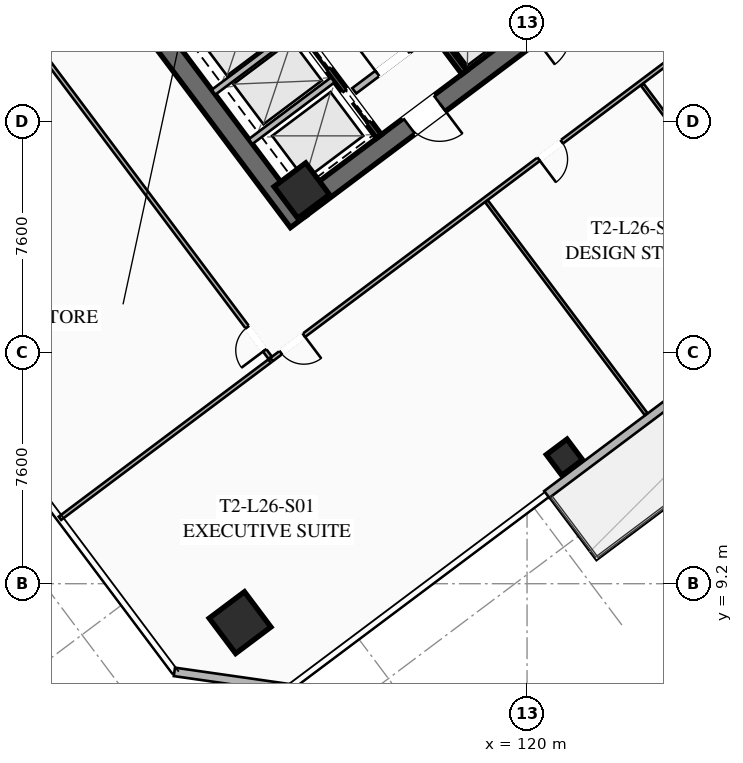
"""IFC4 building model, lengths in metres.
Left out: names, types, materials, properties, quantities, classifications, styles, units other than length and angle.
Written with IfcOpenShell. Run it as: python <this file> out.ifc"""

import sys

from ifc_helpers import new_model, si_unit, direction, frame, frame_2d, origin, origin_2d, place, context, subcontext, project, spatial, rectangle, hollow_rectangle, extrude, element, fill, save


model = new_model("IFC4")
c1 = context("Model", 3, precision=1e-05, world=origin(), true_north=direction((0.0, 1.0)))
c2 = subcontext(c1, "Body", "Model", "MODEL_VIEW")
j1 = project(units=[si_unit("LENGTHUNIT", "METRE"), si_unit("PLANEANGLEUNIT", "RADIAN")], contexts=[c1])
p1 = place(None, origin())
s1 = spatial("IfcSite", under=j1, at=p1, CompositionType="ELEMENT")
p2 = place(p1, origin())
s2 = spatial("IfcBuilding", under=s1, at=p2, CompositionType="ELEMENT")
p3 = place(p2, frame((0.0, 0.0, 99.15)))
s3 = spatial("IfcBuildingStorey", under=s2, at=p3, CompositionType="ELEMENT", Elevation=99.15)
p4 = place(p3, frame((112.476, 21.107, 0.0), z_axis=(0.0, 0.0, 1.0), x_axis=(-0.600005007985, 0.799996243986, 0.0)))
e1 = element("IfcWall", 1, at=p4, inside=s3, PredefinedType="SHEAR", context=c2, shape_type="SweptSolid", body=[
    extrude(rectangle(XDim=15.6, YDim=0.65, at=frame_2d((7.8, 0.0))), origin(), (0.0, 0.0, 1.0), 3.55),
])
p5 = place(p3, frame((124.429, 30.478, 0.0), z_axis=(0.0, 0.0, 1.0), x_axis=(-0.799998028465, -0.600002628705, 0.0)))
e2 = element("IfcWall", 2, at=p5, inside=s3, PredefinedType="SHEAR", context=c2, shape_type="SweptSolid", body=[
    extrude(rectangle(XDim=14.86, YDim=0.65, at=frame_2d((7.43, 0.0))), origin(), (0.0, 0.0, 1.0), 3.55),
])
p6 = place(p5, frame((9.13, 0.0, 0.0)))
e3 = element("IfcOpeningElement", 3, at=p6, cuts=e2, PredefinedType="OPENING", context=c2, shape_type="SweptSolid", body=[
    extrude(rectangle(XDim=1.25, YDim=2.25, at=frame_2d((0.625, 1.125))), frame((0.0, 0.335, 0.0), z_axis=(0.0, -1.0, 0.0), x_axis=(1.0, 0.0, 0.0)), (0.0, 0.0, 1.0), 0.67),
])
p7 = place(p5, frame((4.08, 0.0, 0.0)))
e4 = element("IfcOpeningElement", 4, at=p7, cuts=e2, PredefinedType="OPENING", context=c2, shape_type="SweptSolid", body=[
    extrude(rectangle(XDim=1.25, YDim=2.25, at=frame_2d((0.625, 1.125))), frame((0.0, 0.335, 0.0), z_axis=(0.0, -1.0, 0.0), x_axis=(1.0, 0.0, 0.0)), (0.0, 0.0, 1.0), 0.67),
])
p8 = place(p3, frame((112.59, 22.13, 0.0), z_axis=(0.0, 0.0, 1.0), x_axis=(0.799999996291, 0.600000004945, 0.0)))
e5 = element("IfcColumn", 5, at=p8, inside=s3, PredefinedType="COLUMN", context=c2, shape_type="SweptSolid", body=[
    extrude(hollow_rectangle(XDim=1.3, YDim=1.3, WallThickness=0.05, at=origin_2d()), origin(), (0.0, 0.0, 1.0), 3.35),
])
p9 = place(p3, frame((110.56, 7.92, 0.0), z_axis=(0.0, 0.0, 1.0), x_axis=(0.799999996291, 0.600000004945, 0.0)))
e6 = element("IfcColumn", 6, at=p9, inside=s3, PredefinedType="COLUMN", context=c2, shape_type="SweptSolid", body=[
    extrude(hollow_rectangle(XDim=1.45, YDim=1.45, WallThickness=0.055, at=origin_2d()), origin(), (0.0, 0.0, 1.0), 3.35),
])
p10 = place(p3, frame((121.23, 13.36, 0.0), z_axis=(0.0, 0.0, 1.0), x_axis=(0.799999996291, 0.600000004945, 0.0)))
e7 = element("IfcColumn", 7, at=p10, inside=s3, PredefinedType="COLUMN", context=c2, shape_type="SweptSolid", body=[
    extrude(hollow_rectangle(XDim=0.85, YDim=0.85, WallThickness=0.035, at=origin_2d()), origin(), (0.0, 0.0, 1.0), 3.35),
])
p11 = place(p3, frame((131.208, 20.056, 0.0), z_axis=(0.0, 0.0, 1.0), x_axis=(-0.800004438899, -0.599994081423, 0.0)))
e8 = element("IfcWall", 8, at=p11, inside=s3, PredefinedType="SOLIDWALL", context=c2, shape_type="SweptSolid", body=[
    extrude(rectangle(XDim=13.2, YDim=0.28, at=frame_2d((6.6, 0.0))), origin(), (0.0, 0.0, 1.0), 3.35),
])
p12 = place(p11, frame((5.95, 0.0, 0.0)))
e9 = element("IfcOpeningElement", 9, at=p12, cuts=e8, PredefinedType="OPENING", context=c2, shape_type="SweptSolid", body=[
    extrude(rectangle(XDim=1.3, YDim=2.15, at=frame_2d((0.65, 1.075))), frame((0.0, 0.15, 0.0), z_axis=(0.0, -1.0, 0.0), x_axis=(1.0, 0.0, 0.0)), (0.0, 0.0, 1.0), 0.3),
])
p13 = place(p3, frame((112.18, 5.76, 0.0), z_axis=(0.0, 0.0, 1.0), x_axis=(-0.989948214866, 0.141430307517, 0.0)))
e10 = element("IfcWall", 10, at=p13, inside=s3, PredefinedType="SOLIDWALL", context=c2, shape_type="SweptSolid", body=[
    extrude(rectangle(XDim=3.818, YDim=0.28, at=frame_2d((1.909, 0.0))), origin(), (0.0, 0.0, 1.0), 3.35),
])
p14 = place(p3, frame((117.938, 26.016, 0.0), z_axis=(0.0, 0.0, 1.0), x_axis=(-0.600005463273, 0.799995902516, 0.0)))
e11 = element("IfcWall", 11, at=p14, inside=s3, PredefinedType="SHEAR", context=c2, shape_type="SweptSolid", body=[
    extrude(rectangle(XDim=14.3, YDim=0.2, at=frame_2d((7.15, 0.0))), origin(), (0.0, 0.0, 1.0), 3.35),
])
p15 = place(p3, frame((114.316, 25.412, 0.0), z_axis=(0.0, 0.0, 1.0), x_axis=(0.800018601094, 0.59997519774, 0.0)))
e12 = element("IfcWall", 12, at=p15, inside=s3, PredefinedType="SOLIDWALL", context=c2, shape_type="SweptSolid", body=[
    extrude(rectangle(XDim=3.15, YDim=0.22, at=frame_2d((1.575, 0.0))), origin(), (0.0, 0.0, 1.0), 2.703),
])
p16 = place(p15, frame((0.95, 0.0, 0.0)))
e13 = element("IfcOpeningElement", 13, at=p16, cuts=e12, PredefinedType="OPENING", context=c2, shape_type="SweptSolid", body=[
    extrude(rectangle(XDim=1.25, YDim=2.25, at=frame_2d((0.625, 1.125))), frame((0.0, 0.12, 0.0), z_axis=(0.0, -1.0, 0.0), x_axis=(1.0, 0.0, 0.0)), (0.0, 0.0, 1.0), 0.24),
])
p17 = place(p3, frame((115.13, 23.91, 0.0), z_axis=(0.0, 0.0, 1.0), x_axis=(-0.599975393228, 0.800018454488, 0.0)))
e14 = element("IfcWall", 14, at=p17, inside=s3, PredefinedType="SHEAR", context=c2, shape_type="SweptSolid", body=[
    extrude(rectangle(XDim=6.35, YDim=0.2, at=frame_2d((3.175, 0.0))), origin(), (0.0, 0.0, 1.0), 3.35),
])
p18 = place(p17, frame((4.775, 0.0, 0.0)))
e15 = element("IfcOpeningElement", 15, at=p18, cuts=e14, PredefinedType="OPENING", context=c2, shape_type="SweptSolid", body=[
    extrude(rectangle(XDim=1.3, YDim=2.25, at=frame_2d((0.65, 1.125))), frame((0.0, 0.11, 0.0), z_axis=(0.0, -1.0, 0.0), x_axis=(1.0, 0.0, 0.0)), (0.0, 0.0, 1.0), 0.22),
])
p19 = place(p17, frame((2.775, 0.0, 0.0)))
e16 = element("IfcOpeningElement", 16, at=p19, cuts=e14, PredefinedType="OPENING", context=c2, shape_type="SweptSolid", body=[
    extrude(rectangle(XDim=1.3, YDim=2.25, at=frame_2d((0.65, 1.125))), frame((0.0, 0.11, 0.0), z_axis=(0.0, -1.0, 0.0), x_axis=(1.0, 0.0, 0.0)), (0.0, 0.0, 1.0), 0.22),
])
p20 = place(p17, frame((0.575, 0.0, 0.0)))
e17 = element("IfcOpeningElement", 17, at=p20, cuts=e14, PredefinedType="OPENING", context=c2, shape_type="SweptSolid", body=[
    extrude(rectangle(XDim=1.3, YDim=2.25, at=frame_2d((0.65, 1.125))), frame((0.0, 0.11, 0.0), z_axis=(0.0, -1.0, 0.0), x_axis=(1.0, 0.0, 0.0)), (0.0, 0.0, 1.0), 0.22),
])
for number, where, z_axis, x_axis in (
    (18, (110.906, 23.742, 0.0), (0.0, 0.0, 1.0), (0.8, 0.6, 0.0)),
    (19, (109.688, 25.366, 0.0), (0.0, 0.0, 1.0), (0.8, 0.6, 0.0)),
):
    element("IfcWall", number, at=place(p3, frame(where, z_axis=z_axis, x_axis=x_axis)), inside=s3, PredefinedType="SOLIDWALL", context=c2, shape_type="SweptSolid", body=[
        extrude(rectangle(XDim=3.38, YDim=0.2, at=frame_2d((1.69, 0.0))), origin(), (0.0, 0.0, 1.0), 3.35),
    ])
p21 = place(p3, frame((134.18, 33.51, 0.0), z_axis=(0.0, 0.0, 1.0), x_axis=(-0.8, -0.6, 0.0)))
e20 = element("IfcWall", 20, at=p21, inside=s3, PredefinedType="PARTITIONING", context=c2, shape_type="SweptSolid", body=[
    extrude(rectangle(XDim=28.23, YDim=0.135, at=frame_2d((14.115, 0.0))), origin(), (0.0, 0.0, 1.0), 2.703),
])
p22 = place(p21, frame((26.9, 0.0, 0.0)))
e21 = element("IfcOpeningElement", 21, at=p22, cuts=e20, PredefinedType="OPENING", context=c2, shape_type="SweptSolid", body=[
    extrude(rectangle(XDim=0.95, YDim=2.05, at=frame_2d((0.475, 1.025))), frame((0.0, 0.077, 0.0), z_axis=(0.0, -1.0, 0.0), x_axis=(1.0, 0.0, 0.0)), (0.0, 0.0, 1.0), 0.155),
])
p23 = place(p21, frame((16.296, 0.0, 0.0)))
e22 = element("IfcOpeningElement", 22, at=p23, cuts=e20, PredefinedType="OPENING", context=c2, shape_type="SweptSolid", body=[
    extrude(rectangle(XDim=0.95, YDim=2.05, at=frame_2d((0.475, 1.025))), frame((0.0, 0.077, 0.0), z_axis=(0.0, -1.0, 0.0), x_axis=(1.0, 0.0, 0.0)), (0.0, 0.0, 1.0), 0.155),
])
p24 = place(p21, frame((10.433, 0.0, 0.0)))
e23 = element("IfcOpeningElement", 23, at=p24, cuts=e20, PredefinedType="OPENING", context=c2, shape_type="SweptSolid", body=[
    extrude(rectangle(XDim=0.95, YDim=2.05, at=frame_2d((0.475, 1.025))), frame((0.0, 0.077, 0.0), z_axis=(0.0, -1.0, 0.0), x_axis=(1.0, 0.0, 0.0)), (0.0, 0.0, 1.0), 0.155),
])
p25 = place(p21, frame((0.38, 0.0, 0.0)))
e24 = element("IfcOpeningElement", 24, at=p25, cuts=e20, PredefinedType="OPENING", context=c2, shape_type="SweptSolid", body=[
    extrude(rectangle(XDim=0.95, YDim=2.05, at=frame_2d((0.475, 1.025))), frame((0.0, 0.077, 0.0), z_axis=(0.0, -1.0, 0.0), x_axis=(1.0, 0.0, 0.0)), (0.0, 0.0, 1.0), 0.155),
])
for number, where, z_axis, x_axis in (
    (25, (123.918, 14.776, 0.0), (0.0, 0.0, 1.0), (-0.6, 0.8, 0.0)),
    (26, (129.038, 18.616, 0.0), (0.0, 0.0, 1.0), (-0.6, 0.8, 0.0)),
):
    element("IfcWall", number, at=place(p3, frame(where, z_axis=z_axis, x_axis=x_axis)), inside=s3, PredefinedType="PARTITIONING", context=c2, shape_type="SweptSolid", body=[
        extrude(rectangle(XDim=8.75, YDim=0.11, at=frame_2d((4.375, 0.0))), origin(), (0.0, 0.0, 1.0), 2.703),
    ])
p26 = place(p3, frame((111.548, 16.636, 0.0), z_axis=(0.0, 0.0, 1.0), x_axis=(-0.600003610192, 0.799997292343, 0.0)))
e27 = element("IfcWall", 27, at=p26, inside=s3, PredefinedType="PARTITIONING", context=c2, shape_type="SweptSolid", body=[
    extrude(rectangle(XDim=21.64, YDim=0.135, at=frame_2d((10.82, 0.0))), origin(), (0.0, 0.0, 1.0), 2.703),
])
p27 = place(p26, frame((0.3, 0.0, 0.0)))
e28 = element("IfcOpeningElement", 28, at=p27, cuts=e27, PredefinedType="OPENING", context=c2, shape_type="SweptSolid", body=[
    extrude(rectangle(XDim=0.95, YDim=2.05, at=frame_2d((0.475, 1.025))), frame((0.0, 0.077, 0.0), z_axis=(0.0, -1.0, 0.0), x_axis=(1.0, 0.0, 0.0)), (0.0, 0.0, 1.0), 0.155),
])
p28 = place(p3, frame((104.636, 11.352, 0.0), z_axis=(0.0, 0.0, 1.0), x_axis=(0.800006797429, 0.599990936654, 0.0)))
e29 = element("IfcWall", 29, at=p28, inside=s3, PredefinedType="PARTITIONING", context=c2, shape_type="SweptSolid", body=[
    extrude(rectangle(XDim=8.62, YDim=0.135, at=frame_2d((4.31, 0.0))), origin(), (0.0, 0.0, 1.0), 2.703),
])
p29 = place(p6, origin())
e30 = element("IfcDoor", 30, at=p29, inside=s3, OperationType="SINGLE_SWING_LEFT", PredefinedType="DOOR", context=c2, shape_type="SweptSolid", body=[
    extrude(rectangle(XDim=1.25, YDim=2.25, at=frame_2d((0.625, 1.125))), frame((0.0, 0.025, 0.0), z_axis=(0.0, -1.0, 0.0), x_axis=(1.0, 0.0, 0.0)), (0.0, 0.0, 1.0), 0.05),
])
fill(e3, e30)
p30 = place(p16, origin())
e31 = element("IfcDoor", 31, at=p30, inside=s3, OperationType="SINGLE_SWING_LEFT", PredefinedType="DOOR", context=c2, shape_type="SweptSolid", body=[
    extrude(rectangle(XDim=1.25, YDim=2.25, at=frame_2d((0.625, 1.125))), frame((0.0, 0.025, 0.0), z_axis=(0.0, -1.0, 0.0), x_axis=(1.0, 0.0, 0.0)), (0.0, 0.0, 1.0), 0.05),
])
fill(e13, e31)
p31 = place(p22, origin())
e32 = element("IfcDoor", 32, at=p31, inside=s3, OperationType="SINGLE_SWING_LEFT", PredefinedType="DOOR", context=c2, shape_type="SweptSolid", body=[
    extrude(rectangle(XDim=0.95, YDim=2.05, at=frame_2d((0.475, 1.025))), frame((0.0, 0.025, 0.0), z_axis=(0.0, -1.0, 0.0), x_axis=(1.0, 0.0, 0.0)), (0.0, 0.0, 1.0), 0.05),
])
fill(e21, e32)
p32 = place(p23, origin())
e33 = element("IfcDoor", 33, at=p32, inside=s3, OperationType="SINGLE_SWING_RIGHT", PredefinedType="DOOR", context=c2, shape_type="SweptSolid", body=[
    extrude(rectangle(XDim=0.95, YDim=2.05, at=frame_2d((0.475, 1.025))), frame((0.0, 0.025, 0.0), z_axis=(0.0, -1.0, 0.0), x_axis=(1.0, 0.0, 0.0)), (0.0, 0.0, 1.0), 0.05),
])
fill(e22, e33)
p33 = place(p27, origin())
e34 = element("IfcDoor", 34, at=p33, inside=s3, OperationType="SINGLE_SWING_LEFT", PredefinedType="DOOR", context=c2, shape_type="SweptSolid", body=[
    extrude(rectangle(XDim=0.95, YDim=2.05, at=frame_2d((0.475, 1.025))), frame((0.0, 0.025, 0.0), z_axis=(0.0, -1.0, 0.0), x_axis=(1.0, 0.0, 0.0)), (0.0, 0.0, 1.0), 0.05),
])
fill(e28, e34)
p34 = place(p19, origin())
e35 = element("IfcDoor", 35, at=p34, inside=s3, OperationType="SLIDING_TO_LEFT", PredefinedType="DOOR", context=c2, shape_type="SweptSolid", body=[
    extrude(rectangle(XDim=1.3, YDim=2.25, at=frame_2d((0.65, 1.125))), frame((0.0, 0.025, 0.0), z_axis=(0.0, -1.0, 0.0), x_axis=(1.0, 0.0, 0.0)), (0.0, 0.0, 1.0), 0.05),
])
fill(e16, e35)
p35 = place(p20, origin())
e36 = element("IfcDoor", 36, at=p35, inside=s3, OperationType="SLIDING_TO_LEFT", PredefinedType="DOOR", context=c2, shape_type="SweptSolid", body=[
    extrude(rectangle(XDim=1.3, YDim=2.25, at=frame_2d((0.65, 1.125))), frame((0.0, 0.025, 0.0), z_axis=(0.0, -1.0, 0.0), x_axis=(1.0, 0.0, 0.0)), (0.0, 0.0, 1.0), 0.05),
])
fill(e17, e36)
save(model, sys.argv[1])
